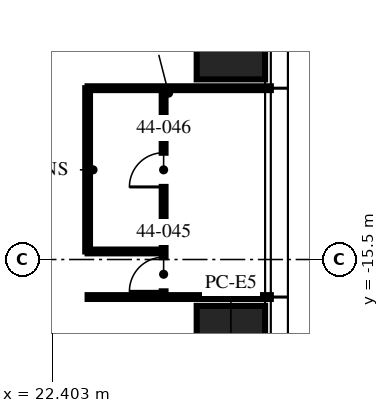
"""IFC4 building model, lengths in metres.
Left out: names, types, materials, properties, quantities, classifications, styles, units other than length and angle.
Written with IfcOpenShell. Run it as: python <this file> out.ifc"""

import sys

from ifc_helpers import new_model, si_unit, direction, frame, frame_2d, origin, origin_2d, place, context, subcontext, project, spatial, rectangle, hollow_rectangle, extrude, element, fill, save


model = new_model("IFC4")
c1 = context("Model", 3, precision=1e-05, world=origin(), true_north=direction((0.0, 1.0)))
c2 = subcontext(c1, "Body", "Model", "MODEL_VIEW")
j1 = project(units=[si_unit("LENGTHUNIT", "METRE"), si_unit("PLANEANGLEUNIT", "RADIAN")], contexts=[c1])
p1 = place(None, origin())
s1 = spatial("IfcSite", under=j1, at=p1, CompositionType="ELEMENT")
p2 = place(p1, origin())
s2 = spatial("IfcBuilding", under=s1, at=p2, CompositionType="ELEMENT")
p3 = place(p2, frame((0.0, 0.0, 174.75)))
s3 = spatial("IfcBuildingStorey", under=s2, at=p3, CompositionType="ELEMENT", Elevation=174.75)
for number, where, z_axis, x_axis in (
    (1, (27.1, -9.16, 0.0), (0.0, 0.0, 1.0), (0.0, 1.0, 0.0)),
    (2, (27.1, -18.32, 0.0), (0.0, 0.0, 1.0), (0.0, 1.0, 0.0)),
):
    element("IfcColumn", number, at=place(p3, frame(where, z_axis=z_axis, x_axis=x_axis)), inside=s3, PredefinedType="COLUMN", context=c2, shape_type="SweptSolid", body=[
        extrude(hollow_rectangle(XDim=3.2, YDim=1.8, WallThickness=0.2, at=origin_2d()), origin(), (0.0, 0.0, 1.0), 3.75),
    ])
for number, where, z_axis, x_axis in (
    (3, (23.33, -16.488, 0.0), (0.0, 0.0, 1.0), (1.0, 0.0, 0.0)),
    (4, (23.33, -10.992, 0.0), (0.0, 0.0, 1.0), (1.0, 0.0, 0.0)),
):
    element("IfcWall", number, at=place(p3, frame(where, z_axis=z_axis, x_axis=x_axis)), inside=s3, PredefinedType="PARTITIONING", context=c2, shape_type="SweptSolid", body=[
        extrude(rectangle(XDim=4.82, YDim=0.1, at=frame_2d((2.41, 0.0))), origin(), (0.0, 0.0, 1.0), 2.81),
    ])
p4 = place(p3, frame((25.33, -16.488, 0.0), z_axis=(0.0, 0.0, 1.0), x_axis=(0.0, 1.0, 0.0)))
e5 = element("IfcWall", 5, at=p4, inside=s3, PredefinedType="PARTITIONING", context=c2, shape_type="SweptSolid", body=[
    extrude(rectangle(XDim=5.496, YDim=0.1, at=frame_2d((2.748, 0.0))), origin(), (0.0, 0.0, 1.0), 2.81),
])
p5 = place(p4, frame((0.15, 0.0, 0.0)))
e6 = element("IfcOpeningElement", 6, at=p5, cuts=e5, PredefinedType="OPENING", context=c2, shape_type="SweptSolid", body=[
    extrude(rectangle(XDim=0.9, YDim=2.1, at=frame_2d((0.45, 1.05))), frame((0.0, 0.06, 0.0), z_axis=(0.0, -1.0, 0.0), x_axis=(1.0, 0.0, 0.0)), (0.0, 0.0, 1.0), 0.12),
])
p6 = place(p4, frame((2.898, 0.0, 0.0)))
e7 = element("IfcOpeningElement", 7, at=p6, cuts=e5, PredefinedType="OPENING", context=c2, shape_type="SweptSolid", body=[
    extrude(rectangle(XDim=0.9, YDim=2.1, at=frame_2d((0.45, 1.05))), frame((0.0, 0.06, 0.0), z_axis=(0.0, -1.0, 0.0), x_axis=(1.0, 0.0, 0.0)), (0.0, 0.0, 1.0), 0.12),
])
p7 = place(p3, frame((23.33, -15.288, 0.0), z_axis=(0.0, 0.0, 1.0), x_axis=(1.0, 0.0, 0.0)))
e8 = element("IfcWall", 8, at=p7, inside=s3, PredefinedType="PARTITIONING", context=c2, shape_type="SweptSolid", body=[
    extrude(rectangle(XDim=2.0, YDim=0.1, at=frame_2d((1.0, 0.0))), origin(), (0.0, 0.0, 1.0), 3.5),
])
p8 = place(p3, frame((23.33, -15.288, 0.0), z_axis=(0.0, 0.0, 1.0), x_axis=(0.0, 1.0, 0.0)))
e9 = element("IfcWall", 9, at=p8, inside=s3, PredefinedType="PARTITIONING", context=c2, shape_type="SweptSolid", body=[
    extrude(rectangle(XDim=4.296, YDim=0.125, at=frame_2d((2.148, 0.0))), origin(), (0.0, 0.0, 1.0), 2.81),
])
p9 = place(p5, origin())
e10 = element("IfcDoor", 10, at=p9, inside=s3, OperationType="SINGLE_SWING_LEFT", PredefinedType="DOOR", context=c2, shape_type="SweptSolid", body=[
    extrude(rectangle(XDim=0.9, YDim=2.1, at=frame_2d((0.45, 1.05))), frame((0.0, 0.025, 0.0), z_axis=(0.0, -1.0, 0.0), x_axis=(1.0, 0.0, 0.0)), (0.0, 0.0, 1.0), 0.05),
])
fill(e6, e10)
p10 = place(p6, origin())
e11 = element("IfcDoor", 11, at=p10, inside=s3, OperationType="SINGLE_SWING_LEFT", PredefinedType="DOOR", context=c2, shape_type="SweptSolid", body=[
    extrude(rectangle(XDim=0.9, YDim=2.1, at=frame_2d((0.45, 1.05))), frame((0.0, 0.025, 0.0), z_axis=(0.0, -1.0, 0.0), x_axis=(1.0, 0.0, 0.0)), (0.0, 0.0, 1.0), 0.05),
])
fill(e7, e11)
save(model, sys.argv[1])
